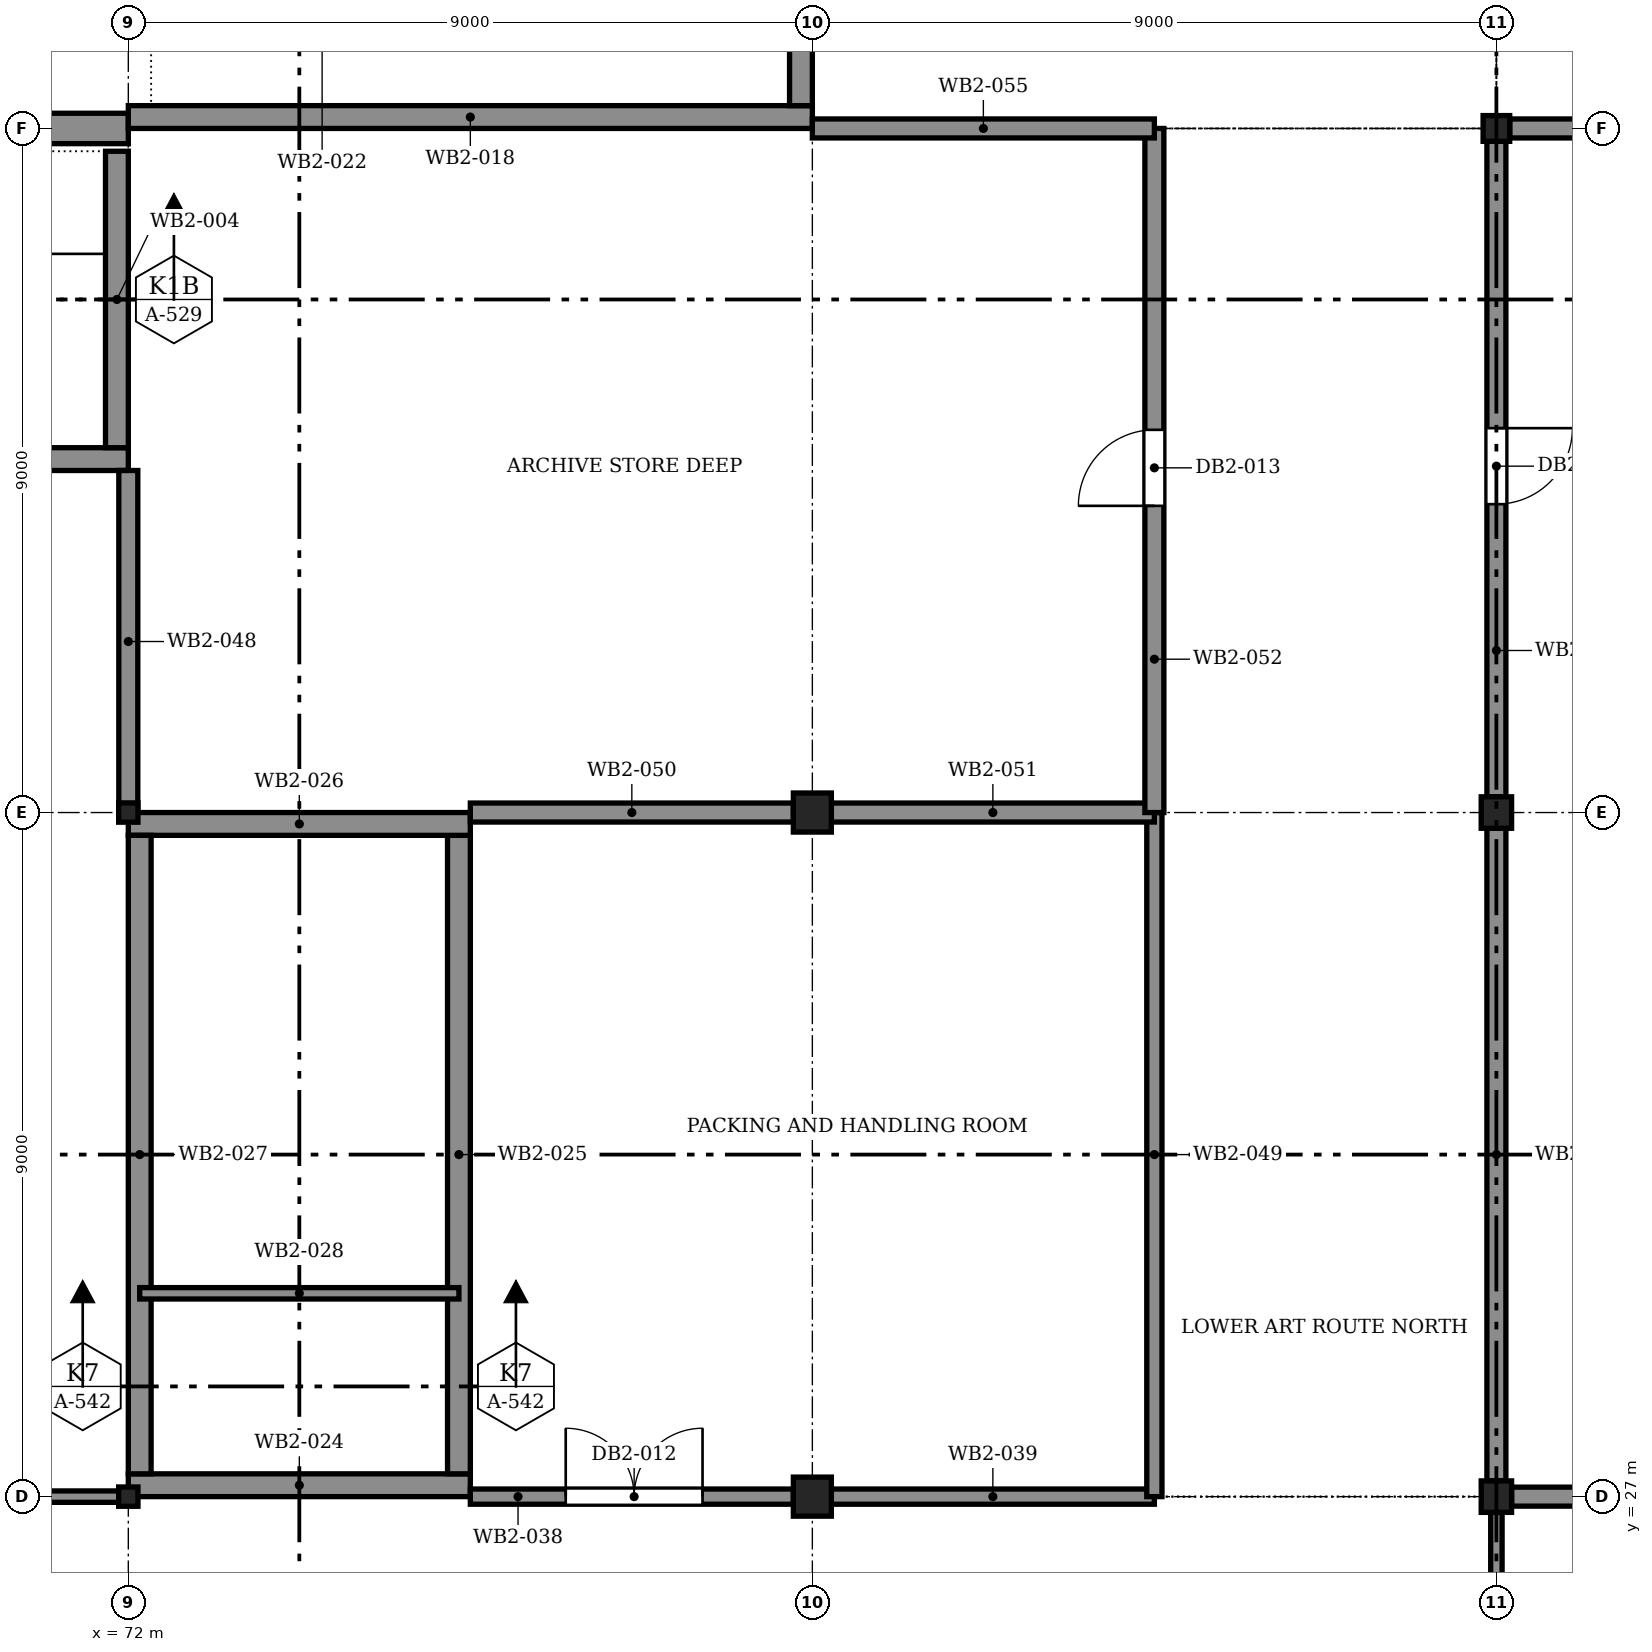
"""IFC4 building model, lengths in metres.
Left out: names, types, materials, properties, quantities, classifications, styles, units other than length and angle.
Written with IfcOpenShell. Run it as: python <this file> out.ifc"""

import sys

from ifc_helpers import new_model, si_unit, direction, frame, frame_2d, origin, origin_2d, place, context, subcontext, project, spatial, rectangle, i_section, extrude, element, fill, save


model = new_model("IFC4")
c1 = context("Model", 3, precision=1e-05, world=origin(), true_north=direction((0.0, 1.0)))
c2 = subcontext(c1, "Body", "Model", "MODEL_VIEW")
j1 = project(units=[si_unit("LENGTHUNIT", "METRE"), si_unit("PLANEANGLEUNIT", "RADIAN")], contexts=[c1])
p1 = place(None, origin())
s1 = spatial("IfcSite", under=j1, at=p1, CompositionType="ELEMENT")
p2 = place(p1, origin())
s2 = spatial("IfcBuilding", under=s1, at=p2, CompositionType="ELEMENT")
p3 = place(p2, frame((0.0, 0.0, -9.6)))
s3 = spatial("IfcBuildingStorey", under=s2, at=p3, CompositionType="ELEMENT", Elevation=-9.6)
p4 = place(p3, frame((27.0, 45.0, 0.0), z_axis=(0.0, 0.0, 1.0), x_axis=(1.0, 0.0, 0.0)))
e1 = element("IfcWall", 1, at=p4, inside=s3, PredefinedType="SOLIDWALL", context=c2, shape_type="SweptSolid", body=[
    extrude(rectangle(XDim=45.0, YDim=0.4, at=frame_2d((22.5, 0.0))), origin(), (0.0, 0.0, 1.0), 4.8),
])
p5 = place(p3, frame((72.0, 45.0, 0.0), z_axis=(0.0, 0.0, 1.0), x_axis=(0.0, 1.0, 0.0)))
e2 = element("IfcWall", 2, at=p5, inside=s3, PredefinedType="SOLIDWALL", context=c2, shape_type="SweptSolid", body=[
    extrude(rectangle(XDim=18.0, YDim=0.4, at=frame_2d((9.0, 0.0))), origin(), (0.0, 0.0, 1.0), 4.8),
])
p6 = place(p3, frame((72.0, 27.0, -0.6), z_axis=(0.0, 0.0, 1.0), x_axis=(1.0, 0.0, 0.0)))
e3 = element("IfcColumn", 3, at=p6, inside=s3, PredefinedType="COLUMN", context=c2, shape_type="SweptSolid", body=[
    extrude(i_section(OverallWidth=0.254, OverallDepth=0.254, WebThickness=0.009, FlangeThickness=0.014, FilletRadius=0.014, at=origin_2d()), origin(), (0.0, 0.0, 1.0), 5.4),
])
p7 = place(p3, frame((81.0, 27.0, -0.6), z_axis=(0.0, 0.0, 1.0), x_axis=(1.0, 0.0, 0.0)))
e4 = element("IfcColumn", 4, at=p7, inside=s3, PredefinedType="COLUMN", context=c2, shape_type="SweptSolid", body=[
    extrude(i_section(OverallWidth=0.5, OverallDepth=0.514, WebThickness=0.025, FlangeThickness=0.032, at=origin_2d()), origin(), (0.0, 0.0, 1.0), 5.4),
])
p8 = place(p3, frame((90.0, 27.0, -0.6), z_axis=(0.0, 0.0, 1.0), x_axis=(1.0, 0.0, 0.0)))
e5 = element("IfcColumn", 5, at=p8, inside=s3, PredefinedType="COLUMN", context=c2, shape_type="SweptSolid", body=[
    extrude(i_section(OverallWidth=0.4, OverallDepth=0.414, WebThickness=0.025, FlangeThickness=0.032, at=origin_2d()), origin(), (0.0, 0.0, 1.0), 5.4),
])
p9 = place(p3, frame((72.0, 36.0, -0.6), z_axis=(0.0, 0.0, 1.0), x_axis=(1.0, 0.0, 0.0)))
e6 = element("IfcColumn", 6, at=p9, inside=s3, PredefinedType="COLUMN", context=c2, shape_type="SweptSolid", body=[
    extrude(i_section(OverallWidth=0.254, OverallDepth=0.254, WebThickness=0.009, FlangeThickness=0.014, FilletRadius=0.014, at=origin_2d()), origin(), (0.0, 0.0, 1.0), 5.4),
])
p10 = place(p3, frame((81.0, 36.0, -0.6), z_axis=(0.0, 0.0, 1.0), x_axis=(1.0, 0.0, 0.0)))
e7 = element("IfcColumn", 7, at=p10, inside=s3, PredefinedType="COLUMN", context=c2, shape_type="SweptSolid", body=[
    extrude(i_section(OverallWidth=0.5, OverallDepth=0.514, WebThickness=0.025, FlangeThickness=0.032, at=origin_2d()), origin(), (0.0, 0.0, 1.0), 5.4),
])
p11 = place(p3, frame((90.0, 36.0, -0.6), z_axis=(0.0, 0.0, 1.0), x_axis=(1.0, 0.0, 0.0)))
e8 = element("IfcColumn", 8, at=p11, inside=s3, PredefinedType="COLUMN", context=c2, shape_type="SweptSolid", body=[
    extrude(i_section(OverallWidth=0.4, OverallDepth=0.414, WebThickness=0.025, FlangeThickness=0.032, at=origin_2d()), origin(), (0.0, 0.0, 1.0), 5.4),
])
p12 = place(p3, frame((90.0, 45.0, -0.6), z_axis=(0.0, 0.0, 1.0), x_axis=(1.0, 0.0, 0.0)))
e9 = element("IfcColumn", 9, at=p12, inside=s3, PredefinedType="COLUMN", context=c2, shape_type="SweptSolid", body=[
    extrude(i_section(OverallWidth=0.35, OverallDepth=0.339, WebThickness=0.025, FlangeThickness=0.032, at=origin_2d()), origin(), (0.0, 0.0, 1.0), 5.4),
])
p13 = place(p3, frame((63.0, 40.65, 0.0), z_axis=(0.0, 0.0, 1.0), x_axis=(1.0, 0.0, 0.0)))
e10 = element("IfcWall", 10, at=p13, inside=s3, PredefinedType="SOLIDWALL", context=c2, shape_type="SweptSolid", body=[
    extrude(rectangle(XDim=9.0, YDim=0.3, at=frame_2d((4.5, 0.0))), origin(), (0.0, 0.0, 1.0), 4.8),
])
p14 = place(p3, frame((71.85, 40.8, 0.0), z_axis=(0.0, 0.0, 1.0), x_axis=(0.0, 1.0, 0.0)))
e11 = element("IfcWall", 11, at=p14, inside=s3, PredefinedType="SOLIDWALL", context=c2, shape_type="SweptSolid", body=[
    extrude(rectangle(XDim=3.9, YDim=0.3, at=frame_2d((1.95, 0.0))), origin(), (0.0, 0.0, 1.0), 4.8),
])
p15 = place(p3, frame((72.0, 45.15, -1.5), z_axis=(0.0, 0.0, 1.0), x_axis=(1.0, 0.0, 0.0)))
e12 = element("IfcWall", 12, at=p15, inside=s3, PredefinedType="SOLIDWALL", context=c2, shape_type="SweptSolid", body=[
    extrude(rectangle(XDim=9.0, YDim=0.3, at=frame_2d((4.5, 0.0))), origin(), (0.0, 0.0, 1.0), 6.3),
])
p16 = place(p3, frame((80.85, 45.3, -1.5), z_axis=(0.0, 0.0, 1.0), x_axis=(0.0, 1.0, 0.0)))
e13 = element("IfcWall", 13, at=p16, inside=s3, PredefinedType="SOLIDWALL", context=c2, shape_type="SweptSolid", body=[
    extrude(rectangle(XDim=8.4, YDim=0.3, at=frame_2d((4.2, 0.0))), origin(), (0.0, 0.0, 1.0), 6.3),
])
p17 = place(p16, frame((3.0, 0.0, 1.5)))
e14 = element("IfcOpeningElement", 14, at=p17, cuts=e13, PredefinedType="OPENING", context=c2, shape_type="SweptSolid", body=[
    extrude(rectangle(XDim=2.4, YDim=2.4, at=frame_2d((1.2, 1.2))), frame((0.0, 0.16, 0.0), z_axis=(0.0, -1.0, 0.0), x_axis=(1.0, 0.0, 0.0)), (0.0, 0.0, 1.0), 0.32),
])
p18 = place(p3, frame((72.0, 27.15, 0.0), z_axis=(0.0, 0.0, 1.0), x_axis=(1.0, 0.0, 0.0)))
e15 = element("IfcWall", 15, at=p18, inside=s3, PredefinedType="SOLIDWALL", context=c2, shape_type="SweptSolid", body=[
    extrude(rectangle(XDim=4.5, YDim=0.3, at=frame_2d((2.25, 0.0))), origin(), (0.0, 0.0, 1.0), 4.8),
])
p19 = place(p3, frame((76.35, 27.3, 0.0), z_axis=(0.0, 0.0, 1.0), x_axis=(0.0, 1.0, 0.0)))
e16 = element("IfcWall", 16, at=p19, inside=s3, PredefinedType="SOLIDWALL", context=c2, shape_type="SweptSolid", body=[
    extrude(rectangle(XDim=8.4, YDim=0.3, at=frame_2d((4.2, 0.0))), origin(), (0.0, 0.0, 1.0), 4.8),
])
p20 = place(p3, frame((72.0, 35.85, 0.0), z_axis=(0.0, 0.0, 1.0), x_axis=(1.0, 0.0, 0.0)))
e17 = element("IfcWall", 17, at=p20, inside=s3, PredefinedType="SOLIDWALL", context=c2, shape_type="SweptSolid", body=[
    extrude(rectangle(XDim=4.5, YDim=0.3, at=frame_2d((2.25, 0.0))), origin(), (0.0, 0.0, 1.0), 4.8),
])
p21 = place(p3, frame((72.15, 27.3, 0.0), z_axis=(0.0, 0.0, 1.0), x_axis=(0.0, 1.0, 0.0)))
e18 = element("IfcWall", 18, at=p21, inside=s3, PredefinedType="SOLIDWALL", context=c2, shape_type="SweptSolid", body=[
    extrude(rectangle(XDim=8.4, YDim=0.3, at=frame_2d((4.2, 0.0))), origin(), (0.0, 0.0, 1.0), 4.8),
])
p22 = place(p3, frame((72.15, 29.675, 0.0), z_axis=(0.0, 0.0, 1.0), x_axis=(1.0, 0.0, 0.0)))
e19 = element("IfcWall", 19, at=p22, inside=s3, PredefinedType="SOLIDWALL", context=c2, shape_type="SweptSolid", body=[
    extrude(rectangle(XDim=4.2, YDim=0.15, at=frame_2d((2.1, 0.0))), origin(), (0.0, 0.0, 1.0), 4.8),
])
p23 = place(p3, frame((90.0, 22.5, 0.0), z_axis=(0.0, 0.0, 1.0), x_axis=(0.0, 1.0, 0.0)))
e20 = element("IfcWall", 20, at=p23, inside=s3, PredefinedType="PARTITIONING", context=c2, shape_type="SweptSolid", body=[
    extrude(rectangle(XDim=4.293, YDim=0.15, at=frame_2d((2.146, 0.0))), origin(), (0.0, 0.0, 1.0), 3.758),
])
p24 = place(p23, frame((0.81, 0.0, 0.0)))
e21 = element("IfcOpeningElement", 21, at=p24, cuts=e20, PredefinedType="OPENING", context=c2, shape_type="SweptSolid", body=[
    extrude(rectangle(XDim=1.0, YDim=2.1, at=frame_2d((0.5, 1.05))), frame((0.0, 0.085, 0.0), z_axis=(0.0, -1.0, 0.0), x_axis=(1.0, 0.0, 0.0)), (0.0, 0.0, 1.0), 0.17),
])
p25 = place(p3, frame((63.2, 27.0, 0.0), z_axis=(0.0, 0.0, 1.0), x_axis=(1.0, 0.0, 0.0)))
e22 = element("IfcWall", 22, at=p25, inside=s3, PredefinedType="PARTITIONING", context=c2, shape_type="SweptSolid", body=[
    extrude(rectangle(XDim=8.8, YDim=0.15, at=frame_2d((4.4, 0.0))), origin(), (0.0, 0.0, 1.0), 3.758),
])
p26 = place(p25, frame((3.85, 0.0, 0.0)))
e23 = element("IfcOpeningElement", 23, at=p26, cuts=e22, PredefinedType="OPENING", context=c2, shape_type="SweptSolid", body=[
    extrude(rectangle(XDim=1.0, YDim=2.1, at=frame_2d((0.5, 1.05))), frame((0.0, 0.085, 0.0), z_axis=(0.0, -1.0, 0.0), x_axis=(1.0, 0.0, 0.0)), (0.0, 0.0, 1.0), 0.17),
])
p27 = place(p3, frame((76.5, 27.0, 0.0), z_axis=(0.0, 0.0, 1.0), x_axis=(1.0, 0.0, 0.0)))
e24 = element("IfcWall", 24, at=p27, inside=s3, PredefinedType="PARTITIONING", context=c2, shape_type="SweptSolid", body=[
    extrude(rectangle(XDim=4.25, YDim=0.2, at=frame_2d((2.125, 0.0))), origin(), (0.0, 0.0, 1.0), 3.758),
])
p28 = place(p27, frame((1.255, 0.0, 0.0)))
e25 = element("IfcOpeningElement", 25, at=p28, cuts=e24, PredefinedType="OPENING", context=c2, shape_type="SweptSolid", body=[
    extrude(rectangle(XDim=1.8, YDim=2.1, at=frame_2d((0.9, 1.05))), frame((0.0, 0.11, 0.0), z_axis=(0.0, -1.0, 0.0), x_axis=(1.0, 0.0, 0.0)), (0.0, 0.0, 1.0), 0.22),
])
p29 = place(p3, frame((81.25, 27.0, 0.0), z_axis=(0.0, 0.0, 1.0), x_axis=(1.0, 0.0, 0.0)))
e26 = element("IfcWall", 26, at=p29, inside=s3, PredefinedType="PARTITIONING", context=c2, shape_type="SweptSolid", body=[
    extrude(rectangle(XDim=4.25, YDim=0.2, at=frame_2d((2.125, 0.0))), origin(), (0.0, 0.0, 1.0), 3.758),
])
p30 = place(p3, frame((90.2, 27.0, 0.0), z_axis=(0.0, 0.0, 1.0), x_axis=(1.0, 0.0, 0.0)))
e27 = element("IfcWall", 27, at=p30, inside=s3, PredefinedType="PARTITIONING", context=c2, shape_type="SweptSolid", body=[
    extrude(rectangle(XDim=8.55, YDim=0.25, at=frame_2d((4.275, 0.0))), origin(), (0.0, 0.0, 1.0), 3.758),
])
p31 = place(p3, frame((72.0, 36.0, 0.0), z_axis=(0.0, 0.0, 1.0), x_axis=(0.0, 1.0, 0.0)))
e28 = element("IfcWall", 28, at=p31, inside=s3, PredefinedType="PARTITIONING", context=c2, shape_type="SweptSolid", body=[
    extrude(rectangle(XDim=4.5, YDim=0.25, at=frame_2d((2.25, 0.0))), origin(), (0.0, 0.0, 1.0), 3.758),
])
p32 = place(p3, frame((85.5, 27.0, 0.0), z_axis=(0.0, 0.0, 1.0), x_axis=(0.0, 1.0, 0.0)))
e29 = element("IfcWall", 29, at=p32, inside=s3, PredefinedType="PARTITIONING", context=c2, shape_type="SweptSolid", body=[
    extrude(rectangle(XDim=9.0, YDim=0.2, at=frame_2d((4.5, 0.0))), origin(), (0.0, 0.0, 1.0), 3.758),
])
for number, where, z_axis, x_axis in (
    (30, (76.5, 36.0, 0.0), (0.0, 0.0, 1.0), (1.0, 0.0, 0.0)),
    (31, (81.25, 36.0, 0.0), (0.0, 0.0, 1.0), (1.0, 0.0, 0.0)),
):
    element("IfcWall", number, at=place(p3, frame(where, z_axis=z_axis, x_axis=x_axis)), inside=s3, PredefinedType="PARTITIONING", context=c2, shape_type="SweptSolid", body=[
        extrude(rectangle(XDim=4.25, YDim=0.25, at=frame_2d((2.125, 0.0))), origin(), (0.0, 0.0, 1.0), 3.758),
    ])
p33 = place(p3, frame((85.5, 36.0, 0.0), z_axis=(0.0, 0.0, 1.0), x_axis=(0.0, 1.0, 0.0)))
e32 = element("IfcWall", 32, at=p33, inside=s3, PredefinedType="PARTITIONING", context=c2, shape_type="SweptSolid", body=[
    extrude(rectangle(XDim=9.0, YDim=0.25, at=frame_2d((4.5, 0.0))), origin(), (0.0, 0.0, 1.0), 3.758),
])
p34 = place(p33, frame((4.035, 0.0, 0.0)))
e33 = element("IfcOpeningElement", 33, at=p34, cuts=e32, PredefinedType="OPENING", context=c2, shape_type="SweptSolid", body=[
    extrude(rectangle(XDim=1.0, YDim=2.1, at=frame_2d((0.5, 1.05))), frame((0.0, 0.135, 0.0), z_axis=(0.0, -1.0, 0.0), x_axis=(1.0, 0.0, 0.0)), (0.0, 0.0, 1.0), 0.27),
])
p35 = place(p3, frame((90.0, 27.207, 0.0), z_axis=(0.0, 0.0, 1.0), x_axis=(0.0, 1.0, 0.0)))
e34 = element("IfcWall", 34, at=p35, inside=s3, PredefinedType="PARTITIONING", context=c2, shape_type="SweptSolid", body=[
    extrude(rectangle(XDim=8.586, YDim=0.25, at=frame_2d((4.293, 0.0))), origin(), (0.0, 0.0, 1.0), 3.758),
])
p36 = place(p3, frame((90.0, 36.207, 0.0), z_axis=(0.0, 0.0, 1.0), x_axis=(0.0, 1.0, 0.0)))
e35 = element("IfcWall", 35, at=p36, inside=s3, PredefinedType="PARTITIONING", context=c2, shape_type="SweptSolid", body=[
    extrude(rectangle(XDim=8.624, YDim=0.25, at=frame_2d((4.312, 0.0))), origin(), (0.0, 0.0, 1.0), 3.758),
])
p37 = place(p36, frame((3.85, 0.0, 0.0)))
e36 = element("IfcOpeningElement", 36, at=p37, cuts=e35, PredefinedType="OPENING", context=c2, shape_type="SweptSolid", body=[
    extrude(rectangle(XDim=1.0, YDim=2.1, at=frame_2d((0.5, 1.05))), frame((0.0, 0.135, 0.0), z_axis=(0.0, -1.0, 0.0), x_axis=(1.0, 0.0, 0.0)), (0.0, 0.0, 1.0), 0.27),
])
p38 = place(p3, frame((81.0, 45.0, 0.0), z_axis=(0.0, 0.0, 1.0), x_axis=(1.0, 0.0, 0.0)))
e37 = element("IfcWall", 37, at=p38, inside=s3, PredefinedType="PARTITIONING", context=c2, shape_type="SweptSolid", body=[
    extrude(rectangle(XDim=4.5, YDim=0.25, at=frame_2d((2.25, 0.0))), origin(), (0.0, 0.0, 1.0), 3.758),
])
p39 = place(p3, frame((90.175, 45.0, 0.0), z_axis=(0.0, 0.0, 1.0), x_axis=(1.0, 0.0, 0.0)))
e38 = element("IfcWall", 38, at=p39, inside=s3, PredefinedType="PARTITIONING", context=c2, shape_type="SweptSolid", body=[
    extrude(rectangle(XDim=8.65, YDim=0.25, at=frame_2d((4.325, 0.0))), origin(), (0.0, 0.0, 1.0), 3.758),
])
p40 = place(p28, origin())
e39 = element("IfcDoor", 39, at=p40, inside=s3, OperationType="DOUBLE_DOOR_SINGLE_SWING", PredefinedType="DOOR", context=c2, shape_type="SweptSolid", body=[
    extrude(rectangle(XDim=1.8, YDim=2.1, at=frame_2d((0.9, 1.05))), frame((0.0, 0.025, 0.0), z_axis=(0.0, -1.0, 0.0), x_axis=(1.0, 0.0, 0.0)), (0.0, 0.0, 1.0), 0.05),
])
fill(e25, e39)
p41 = place(p34, origin())
e40 = element("IfcDoor", 40, at=p41, inside=s3, OperationType="SINGLE_SWING_RIGHT", PredefinedType="DOOR", context=c2, shape_type="SweptSolid", body=[
    extrude(rectangle(XDim=1.0, YDim=2.1, at=frame_2d((0.5, 1.05))), frame((0.0, 0.025, 0.0), z_axis=(0.0, -1.0, 0.0), x_axis=(1.0, 0.0, 0.0)), (0.0, 0.0, 1.0), 0.05),
])
fill(e33, e40)
p42 = place(p37, frame((1.0, 0.0, 0.0), z_axis=(0.0, 0.0, 1.0), x_axis=(-1.0, 0.0, 0.0)))
e41 = element("IfcDoor", 41, at=p42, inside=s3, OperationType="SINGLE_SWING_RIGHT", PredefinedType="DOOR", context=c2, shape_type="SweptSolid", body=[
    extrude(rectangle(XDim=1.0, YDim=2.1, at=frame_2d((0.5, 1.05))), frame((0.0, 0.025, 0.0), z_axis=(0.0, -1.0, 0.0), x_axis=(1.0, 0.0, 0.0)), (0.0, 0.0, 1.0), 0.05),
])
fill(e36, e41)
save(model, sys.argv[1])
